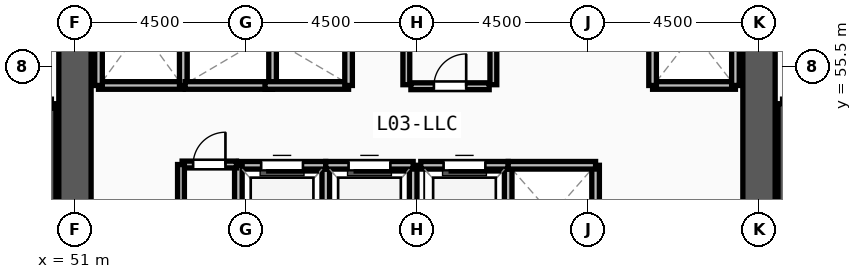
"""IFC4 building model, lengths in metres.
Left out: names, types, materials, properties, quantities, classifications, styles, units other than length and angle.
Written with IfcOpenShell. Run it as: python <this file> out.ifc"""

import sys

from ifc_helpers import new_model, si_unit, direction, frame, frame_2d, origin, place, context, subcontext, project, spatial, rectangle, extrude, source, transform, mapped, element, fill, save


model = new_model("IFC4")
c1 = context("Model", 3, precision=1e-05, world=origin(), true_north=direction((0.0, 1.0)))
c2 = subcontext(c1, "Body", "Model", "MODEL_VIEW")
j1 = project(units=[si_unit("LENGTHUNIT", "METRE"), si_unit("PLANEANGLEUNIT", "RADIAN")], contexts=[c1])
p1 = place(None, origin())
s1 = spatial("IfcSite", under=j1, at=p1, CompositionType="ELEMENT")
p2 = place(p1, origin())
s2 = spatial("IfcBuilding", under=s1, at=p2, CompositionType="ELEMENT")
p3 = place(p2, frame((0.0, 0.0, 9.9)))
s3 = spatial("IfcBuildingStorey", under=s2, at=p3, CompositionType="ELEMENT", Elevation=9.9)
p4 = place(p3, frame((69.0, 60.6, 0.0), z_axis=(0.0, 0.0, 1.0), x_axis=(0.0, -1.0, 0.0)))
e1 = element("IfcWall", 1, at=p4, inside=s3, PredefinedType="SHEAR", context=c2, shape_type="SweptSolid", body=[
    extrude(rectangle(XDim=13.2, YDim=0.85, at=frame_2d((6.6, 0.0))), origin(), (0.0, 0.0, 1.0), 4.25),
])
m1 = source(origin(), c2, "Body", "SweptSolid", [
    extrude(rectangle(XDim=1.2, YDim=2.2, at=frame_2d((0.6, 1.1))), frame((0.0, 0.435, 0.0), z_axis=(0.0, -1.0, 0.0), x_axis=(1.0, 0.0, 0.0)), (0.0, 0.0, 1.0), 0.87),
])
p5 = place(p4, frame((1.05, 0.0, 0.0)))
e2 = element("IfcOpeningElement", 2, at=p5, cuts=e1, PredefinedType="OPENING", context=c2, shape_type="MappedRepresentation", body=[
    mapped(m1, transform((0.0, 0.0, 0.0), x_axis=(1.0, 0.0, 0.0), y_axis=(0.0, 1.0, 0.0), z_axis=(0.0, 0.0, 1.0), scale=1.0)),
])
p6 = place(p3, frame((51.0, 47.4, 0.0), z_axis=(0.0, 0.0, 1.0), x_axis=(0.0, 1.0, 0.0)))
e3 = element("IfcWall", 3, at=p6, inside=s3, PredefinedType="SHEAR", context=c2, shape_type="SweptSolid", body=[
    extrude(rectangle(XDim=13.2, YDim=0.85, at=frame_2d((6.6, 0.0))), origin(), (0.0, 0.0, 1.0), 4.25),
])
for number, where, z_axis, x_axis in (
    (4, (50.38, 46.7, 0.0), (0.0, 0.0, 1.0), (0.0, 1.0, 0.0)),
    (5, (69.62, 54.52, 0.0), (0.0, 0.0, 1.0), (0.0, -1.0, 0.0)),
):
    element("IfcWall", number, at=place(p3, frame(where, z_axis=z_axis, x_axis=x_axis)), inside=s3, PredefinedType="SOLIDWALL", context=c2, shape_type="SweptSolid", body=[
        extrude(rectangle(XDim=7.82, YDim=0.24, at=frame_2d((3.91, 0.0))), origin(), (0.0, 0.0, 1.0), 4.25),
    ])
p7 = place(p3, frame((51.62, 55.0, 0.0), z_axis=(0.0, 0.0, 1.0), x_axis=(1.0, 0.0, 0.0)))
e6 = element("IfcWall", 6, at=p7, inside=s3, PredefinedType="SOLIDWALL", context=c2, shape_type="SweptSolid", body=[
    extrude(rectangle(XDim=2.23, YDim=0.2, at=frame_2d((1.115, 0.0))), origin(), (0.0, 0.0, 1.0), 4.25),
])
for number, where, z_axis, x_axis in (
    (7, (53.85, 55.0, 0.0), (0.0, 0.0, 1.0), (0.0, 1.0, 0.0)),
    (8, (51.62, 58.0, 0.0), (0.0, 0.0, 1.0), (0.0, -1.0, 0.0)),
):
    element("IfcWall", number, at=place(p3, frame(where, z_axis=z_axis, x_axis=x_axis)), inside=s3, PredefinedType="SOLIDWALL", context=c2, shape_type="SweptSolid", body=[
        extrude(rectangle(XDim=3.0, YDim=0.2, at=frame_2d((1.5, 0.0))), origin(), (0.0, 0.0, 1.0), 4.25),
    ])
p8 = place(p3, frame((66.2, 55.0, 0.0), z_axis=(0.0, 0.0, 1.0), x_axis=(1.0, 0.0, 0.0)))
e9 = element("IfcWall", 9, at=p8, inside=s3, PredefinedType="SOLIDWALL", context=c2, shape_type="SweptSolid", body=[
    extrude(rectangle(XDim=2.18, YDim=0.2, at=frame_2d((1.09, 0.0))), origin(), (0.0, 0.0, 1.0), 4.25),
])
for number, where, z_axis, x_axis in (
    (10, (68.38, 55.0, 0.0), (0.0, 0.0, 1.0), (0.0, 1.0, 0.0)),
    (11, (66.2, 57.75, 0.0), (0.0, 0.0, 1.0), (0.0, -1.0, 0.0)),
):
    element("IfcWall", number, at=place(p3, frame(where, z_axis=z_axis, x_axis=x_axis)), inside=s3, PredefinedType="SOLIDWALL", context=c2, shape_type="SweptSolid", body=[
        extrude(rectangle(XDim=2.75, YDim=0.2, at=frame_2d((1.375, 0.0))), origin(), (0.0, 0.0, 1.0), 4.25),
    ])
p9 = place(p3, frame((57.6, 50.3, 0.0), z_axis=(0.0, 0.0, 1.0), x_axis=(0.0, 1.0, 0.0)))
e12 = element("IfcWall", 12, at=p9, inside=s3, PredefinedType="SOLIDWALL", context=c2, shape_type="SweptSolid", body=[
    extrude(rectangle(XDim=2.6, YDim=0.2, at=frame_2d((1.3, 0.0))), origin(), (0.0, 0.0, 1.0), 4.25),
])
p10 = place(p3, frame((57.6, 52.9, 0.0), z_axis=(0.0, 0.0, 1.0), x_axis=(-1.0, 0.0, 0.0)))
e13 = element("IfcWall", 13, at=p10, inside=s3, PredefinedType="SOLIDWALL", context=c2, shape_type="SweptSolid", body=[
    extrude(rectangle(XDim=2.3, YDim=0.2, at=frame_2d((1.15, 0.0))), origin(), (0.0, 0.0, 1.0), 4.25),
])
m2 = source(origin(), c2, "Body", "SweptSolid", [
    extrude(rectangle(XDim=1.1, YDim=2.2, at=frame_2d((0.55, 1.1))), frame((0.0, 0.11, 0.0), z_axis=(0.0, -1.0, 0.0), x_axis=(1.0, 0.0, 0.0)), (0.0, 0.0, 1.0), 0.22),
])
p11 = place(p10, frame((0.6, 0.0, 0.0)))
e14 = element("IfcOpeningElement", 14, at=p11, cuts=e13, PredefinedType="OPENING", context=c2, shape_type="MappedRepresentation", body=[
    mapped(m2, transform((0.0, 0.0, 0.0), x_axis=(1.0, 0.0, 0.0), y_axis=(0.0, 1.0, 0.0), z_axis=(0.0, 0.0, 1.0), scale=1.0)),
])
for number, where, z_axis, x_axis in (
    (15, (55.3, 52.9, 0.0), (0.0, 0.0, 1.0), (0.0, -1.0, 0.0)),
    (16, (59.9, 50.3, 0.0), (0.0, 0.0, 1.0), (0.0, 1.0, 0.0)),
):
    element("IfcWall", number, at=place(p3, frame(where, z_axis=z_axis, x_axis=x_axis)), inside=s3, PredefinedType="SOLIDWALL", context=c2, shape_type="SweptSolid", body=[
        extrude(rectangle(XDim=2.6, YDim=0.2, at=frame_2d((1.3, 0.0))), origin(), (0.0, 0.0, 1.0), 4.25),
    ])
p12 = place(p3, frame((59.9, 52.9, 0.0), z_axis=(0.0, 0.0, 1.0), x_axis=(-1.0, 0.0, 0.0)))
e17 = element("IfcWall", 17, at=p12, inside=s3, PredefinedType="SOLIDWALL", context=c2, shape_type="SweptSolid", body=[
    extrude(rectangle(XDim=2.3, YDim=0.2, at=frame_2d((1.15, 0.0))), origin(), (0.0, 0.0, 1.0), 4.25),
])
p13 = place(p12, frame((0.6, 0.0, 0.0)))
e18 = element("IfcOpeningElement", 18, at=p13, cuts=e17, PredefinedType="OPENING", context=c2, shape_type="MappedRepresentation", body=[
    mapped(m2, transform((0.0, 0.0, 0.0), x_axis=(1.0, 0.0, 0.0), y_axis=(0.0, 1.0, 0.0), z_axis=(0.0, 0.0, 1.0), scale=1.0)),
])
p14 = place(p3, frame((62.4, 50.3, 0.0), z_axis=(0.0, 0.0, 1.0), x_axis=(0.0, 1.0, 0.0)))
e19 = element("IfcWall", 19, at=p14, inside=s3, PredefinedType="SOLIDWALL", context=c2, shape_type="SweptSolid", body=[
    extrude(rectangle(XDim=2.6, YDim=0.2, at=frame_2d((1.3, 0.0))), origin(), (0.0, 0.0, 1.0), 4.25),
])
p15 = place(p3, frame((62.4, 52.9, 0.0), z_axis=(0.0, 0.0, 1.0), x_axis=(-1.0, 0.0, 0.0)))
e20 = element("IfcWall", 20, at=p15, inside=s3, PredefinedType="SOLIDWALL", context=c2, shape_type="SweptSolid", body=[
    extrude(rectangle(XDim=2.3, YDim=0.2, at=frame_2d((1.15, 0.0))), origin(), (0.0, 0.0, 1.0), 4.25),
])
p16 = place(p15, frame((0.6, 0.0, 0.0)))
e21 = element("IfcOpeningElement", 21, at=p16, cuts=e20, PredefinedType="OPENING", context=c2, shape_type="MappedRepresentation", body=[
    mapped(m2, transform((0.0, 0.0, 0.0), x_axis=(1.0, 0.0, 0.0), y_axis=(0.0, 1.0, 0.0), z_axis=(0.0, 0.0, 1.0), scale=1.0)),
])
p17 = place(p3, frame((64.7, 50.3, 0.0), z_axis=(0.0, 0.0, 1.0), x_axis=(0.0, 1.0, 0.0)))
e22 = element("IfcWall", 22, at=p17, inside=s3, PredefinedType="SOLIDWALL", context=c2, shape_type="SweptSolid", body=[
    extrude(rectangle(XDim=2.6, YDim=0.2, at=frame_2d((1.3, 0.0))), origin(), (0.0, 0.0, 1.0), 4.25),
])
for number, where, z_axis, x_axis in (
    (23, (64.7, 52.9, 0.0), (0.0, 0.0, 1.0), (-1.0, 0.0, 0.0)),
    (24, (53.9, 55.0, 0.0), (0.0, 0.0, 1.0), (1.0, 0.0, 0.0)),
):
    element("IfcWall", number, at=place(p3, frame(where, z_axis=z_axis, x_axis=x_axis)), inside=s3, PredefinedType="SOLIDWALL", context=c2, shape_type="SweptSolid", body=[
        extrude(rectangle(XDim=2.3, YDim=0.2, at=frame_2d((1.15, 0.0))), origin(), (0.0, 0.0, 1.0), 4.25),
    ])
p18 = place(p3, frame((56.2, 55.0, 0.0), z_axis=(0.0, 0.0, 1.0), x_axis=(0.0, 1.0, 0.0)))
e25 = element("IfcWall", 25, at=p18, inside=s3, PredefinedType="SOLIDWALL", context=c2, shape_type="SweptSolid", body=[
    extrude(rectangle(XDim=2.6, YDim=0.2, at=frame_2d((1.3, 0.0))), origin(), (0.0, 0.0, 1.0), 4.25),
])
p19 = place(p3, frame((56.0, 55.0, 0.0), z_axis=(0.0, 0.0, 1.0), x_axis=(1.0, 0.0, 0.0)))
e26 = element("IfcWall", 26, at=p19, inside=s3, PredefinedType="SOLIDWALL", context=c2, shape_type="SweptSolid", body=[
    extrude(rectangle(XDim=2.2, YDim=0.2, at=frame_2d((1.1, 0.0))), origin(), (0.0, 0.0, 1.0), 4.25),
])
p20 = place(p3, frame((58.2, 55.0, 0.0), z_axis=(0.0, 0.0, 1.0), x_axis=(0.0, 1.0, 0.0)))
e27 = element("IfcWall", 27, at=p20, inside=s3, PredefinedType="SOLIDWALL", context=c2, shape_type="SweptSolid", body=[
    extrude(rectangle(XDim=2.6, YDim=0.2, at=frame_2d((1.3, 0.0))), origin(), (0.0, 0.0, 1.0), 4.25),
])
p21 = place(p3, frame((59.84, 54.98, 0.0), z_axis=(0.0, 0.0, 1.0), x_axis=(1.0, 0.0, 0.0)))
e28 = element("IfcWall", 28, at=p21, inside=s3, PredefinedType="PARTITIONING", context=c2, shape_type="SweptSolid", body=[
    extrude(rectangle(XDim=2.06, YDim=0.18, at=frame_2d((1.03, 0.0))), origin(), (0.0, 0.0, 1.0), 4.25),
])
m3 = source(origin(), c2, "Body", "SweptSolid", [
    extrude(rectangle(XDim=0.85, YDim=2.1, at=frame_2d((0.425, 1.05))), frame((0.0, 0.1, 0.0), z_axis=(0.0, -1.0, 0.0), x_axis=(1.0, 0.0, 0.0)), (0.0, 0.0, 1.0), 0.2),
])
p22 = place(p21, frame((0.605, 0.0, 0.0)))
e29 = element("IfcOpeningElement", 29, at=p22, cuts=e28, PredefinedType="OPENING", context=c2, shape_type="MappedRepresentation", body=[
    mapped(m3, transform((0.0, 0.0, 0.0), x_axis=(1.0, 0.0, 0.0), y_axis=(0.0, 1.0, 0.0), z_axis=(0.0, 0.0, 1.0), scale=1.0)),
])
p23 = place(p3, frame((53.82, 52.92, 0.0), z_axis=(0.0, 0.0, 1.0), x_axis=(1.0, 0.0, 0.0)))
e30 = element("IfcWall", 30, at=p23, inside=s3, PredefinedType="PARTITIONING", context=c2, shape_type="SweptSolid", body=[
    extrude(rectangle(XDim=1.43, YDim=0.18, at=frame_2d((0.715, 0.0))), origin(), (0.0, 0.0, 1.0), 4.25),
])
p24 = place(p23, frame((0.29, 0.0, 0.0)))
e31 = element("IfcOpeningElement", 31, at=p24, cuts=e30, PredefinedType="OPENING", context=c2, shape_type="MappedRepresentation", body=[
    mapped(m3, transform((0.0, 0.0, 0.0), x_axis=(1.0, 0.0, 0.0), y_axis=(0.0, 1.0, 0.0), z_axis=(0.0, 0.0, 1.0), scale=1.0)),
])
for number, where, z_axis, x_axis in (
    (32, (59.72, 55.02, 0.0), (0.0, 0.0, 1.0), (0.0, 1.0, 0.0)),
    (33, (62.01, 55.02, 0.0), (0.0, 0.0, 1.0), (0.0, 1.0, 0.0)),
):
    element("IfcWall", number, at=place(p3, frame(where, z_axis=z_axis, x_axis=x_axis)), inside=s3, PredefinedType="PARTITIONING", context=c2, shape_type="SweptSolid", body=[
        extrude(rectangle(XDim=2.88, YDim=0.18, at=frame_2d((1.44, 0.0))), origin(), (0.0, 0.0, 1.0), 4.25),
    ])
p25 = place(p3, frame((53.79, 50.35, 0.0), z_axis=(0.0, 0.0, 1.0), x_axis=(0.0, 1.0, 0.0)))
e34 = element("IfcWall", 34, at=p25, inside=s3, PredefinedType="PARTITIONING", context=c2, shape_type="SweptSolid", body=[
    extrude(rectangle(XDim=2.57, YDim=0.18, at=frame_2d((1.285, 0.0))), origin(), (0.0, 0.0, 1.0), 4.25),
])
m4 = source(origin(), c2, "Body", "SweptSolid", [
    extrude(rectangle(XDim=1.1, YDim=2.2, at=frame_2d((0.55, 1.1))), frame((0.0, 0.025, 0.0), z_axis=(0.0, -1.0, 0.0), x_axis=(1.0, 0.0, 0.0)), (0.0, 0.0, 1.0), 0.05),
])
p26 = place(p11, origin())
e35 = element("IfcDoor", 35, at=p26, inside=s3, OperationType="SLIDING_TO_LEFT", PredefinedType="DOOR", context=c2, shape_type="MappedRepresentation", body=[
    mapped(m4, transform((0.0, 0.0, 0.0), x_axis=(1.0, 0.0, 0.0), y_axis=(0.0, 1.0, 0.0), z_axis=(0.0, 0.0, 1.0), scale=1.0)),
])
fill(e14, e35)
p27 = place(p13, origin())
e36 = element("IfcDoor", 36, at=p27, inside=s3, OperationType="SLIDING_TO_LEFT", PredefinedType="DOOR", context=c2, shape_type="MappedRepresentation", body=[
    mapped(m4, transform((0.0, 0.0, 0.0), x_axis=(1.0, 0.0, 0.0), y_axis=(0.0, 1.0, 0.0), z_axis=(0.0, 0.0, 1.0), scale=1.0)),
])
fill(e18, e36)
p28 = place(p16, origin())
e37 = element("IfcDoor", 37, at=p28, inside=s3, OperationType="SLIDING_TO_LEFT", PredefinedType="DOOR", context=c2, shape_type="MappedRepresentation", body=[
    mapped(m4, transform((0.0, 0.0, 0.0), x_axis=(1.0, 0.0, 0.0), y_axis=(0.0, 1.0, 0.0), z_axis=(0.0, 0.0, 1.0), scale=1.0)),
])
fill(e21, e37)
m5 = source(origin(), c2, "Body", "SweptSolid", [
    extrude(rectangle(XDim=0.85, YDim=2.1, at=frame_2d((0.425, 1.05))), frame((0.0, 0.025, 0.0), z_axis=(0.0, -1.0, 0.0), x_axis=(1.0, 0.0, 0.0)), (0.0, 0.0, 1.0), 0.05),
])
p29 = place(p22, origin())
e38 = element("IfcDoor", 38, at=p29, inside=s3, OperationType="SINGLE_SWING_RIGHT", PredefinedType="DOOR", context=c2, shape_type="MappedRepresentation", body=[
    mapped(m5, transform((0.0, 0.0, 0.0), x_axis=(1.0, 0.0, 0.0), y_axis=(0.0, 1.0, 0.0), z_axis=(0.0, 0.0, 1.0), scale=1.0)),
])
fill(e29, e38)
p30 = place(p24, origin())
e39 = element("IfcDoor", 39, at=p30, inside=s3, OperationType="SINGLE_SWING_RIGHT", PredefinedType="DOOR", context=c2, shape_type="MappedRepresentation", body=[
    mapped(m5, transform((0.0, 0.0, 0.0), x_axis=(1.0, 0.0, 0.0), y_axis=(0.0, 1.0, 0.0), z_axis=(0.0, 0.0, 1.0), scale=1.0)),
])
fill(e31, e39)
save(model, sys.argv[1])
